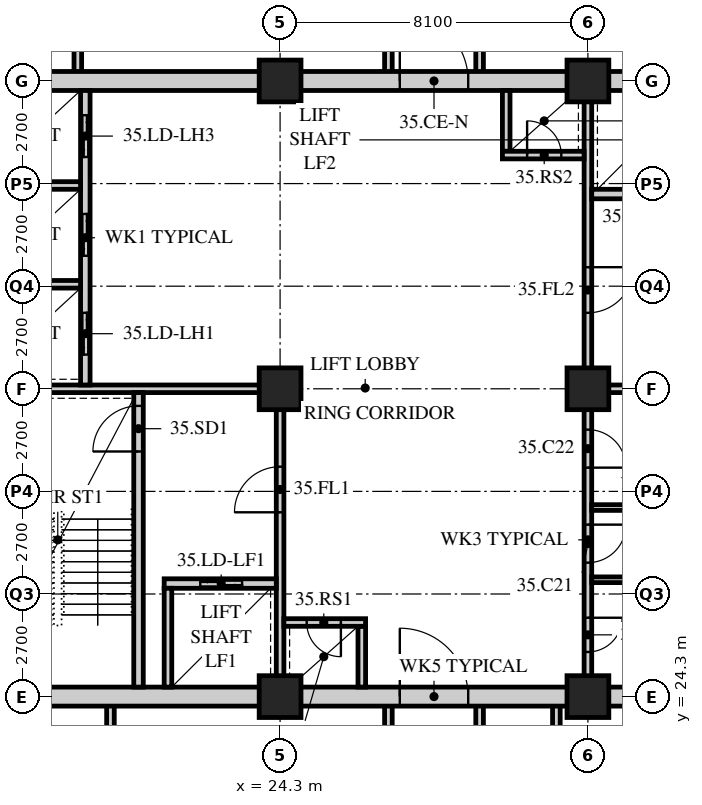
"""IFC4 building model, lengths in metres.
Left out: names, types, materials, properties, quantities, classifications, styles, units other than length and angle.
Written with IfcOpenShell. Run it as: python <this file> out.ifc"""

import sys

from ifc_helpers import new_model, si_unit, direction, frame, frame_2d, origin, origin_2d, place, context, subcontext, project, spatial, rectangle, hollow_rectangle, extrude, element, fill, save


model = new_model("IFC4")
c1 = context("Model", 3, precision=1e-05, world=origin(), true_north=direction((0.0, 1.0)))
c2 = subcontext(c1, "Body", "Model", "MODEL_VIEW")
j1 = project(units=[si_unit("LENGTHUNIT", "METRE"), si_unit("PLANEANGLEUNIT", "RADIAN")], contexts=[c1])
p1 = place(None, origin())
s1 = spatial("IfcSite", under=j1, at=p1, CompositionType="ELEMENT")
p2 = place(p1, origin())
s2 = spatial("IfcBuilding", under=s1, at=p2, CompositionType="ELEMENT")
p3 = place(p2, frame((0.0, 0.0, 137.4)))
s3 = spatial("IfcBuildingStorey", under=s2, at=p3, CompositionType="ELEMENT", Elevation=137.4)
for number, where, z_axis, x_axis in (
    (1, (24.3, 24.3, 0.0), (0.0, 0.0, 1.0), (1.0, 0.0, 0.0)),
    (2, (24.3, 32.4, 0.0), (0.0, 0.0, 1.0), (1.0, 0.0, 0.0)),
    (3, (24.3, 40.5, 0.0), (0.0, 0.0, 1.0), (1.0, 0.0, 0.0)),
    (4, (32.4, 24.3, 0.0), (0.0, 0.0, 1.0), (1.0, 0.0, 0.0)),
    (5, (32.4, 32.4, 0.0), (0.0, 0.0, 1.0), (1.0, 0.0, 0.0)),
    (6, (32.4, 40.5, 0.0), (0.0, 0.0, 1.0), (1.0, 0.0, 0.0)),
):
    element("IfcColumn", number, at=place(p3, frame(where, z_axis=z_axis, x_axis=x_axis)), inside=s3, PredefinedType="COLUMN", context=c2, shape_type="SweptSolid", body=[
        extrude(hollow_rectangle(XDim=1.1, YDim=1.1, WallThickness=0.1, at=origin_2d()), origin(), (0.0, 0.0, 1.0), 3.4),
    ])
for number, where, z_axis, x_axis in (
    (7, (19.836, 19.35, 0.0), (0.0, 0.0, 1.0), (0.0, 1.0, 0.0)),
    (8, (31.57, 19.35, 0.0), (0.0, 0.0, 1.0), (0.0, 1.0, 0.0)),
    (9, (27.15, 19.35, 0.0), (0.0, 0.0, 1.0), (0.0, 1.0, 0.0)),
    (10, (29.55, 19.35, 0.0), (0.0, 0.0, 1.0), (0.0, 1.0, 0.0)),
):
    element("IfcWall", number, at=place(p3, frame(where, z_axis=z_axis, x_axis=x_axis)), inside=s3, PredefinedType="SOLIDWALL", context=c2, shape_type="SweptSolid", body=[
        extrude(rectangle(XDim=4.95, YDim=0.2, at=frame_2d((2.475, 0.0))), origin(), (0.0, 0.0, 1.0), 3.19),
    ])
for number, where, z_axis, x_axis in (
    (11, (18.978, 44.1, 0.0), (0.0, 0.0, 1.0), (0.0, -1.0, 0.0)),
    (12, (27.15, 40.5, 0.0), (0.0, 0.0, 1.0), (0.0, 1.0, 0.0)),
    (13, (29.55, 40.5, 0.0), (0.0, 0.0, 1.0), (0.0, 1.0, 0.0)),
):
    element("IfcWall", number, at=place(p3, frame(where, z_axis=z_axis, x_axis=x_axis)), inside=s3, PredefinedType="SOLIDWALL", context=c2, shape_type="SweptSolid", body=[
        extrude(rectangle(XDim=3.6, YDim=0.2, at=frame_2d((1.8, 0.0))), origin(), (0.0, 0.0, 1.0), 3.19),
    ])
p4 = place(p3, frame((15.95, 24.3, 0.0), z_axis=(0.0, 0.0, 1.0), x_axis=(1.0, 0.0, 0.0)))
e14 = element("IfcWall", 14, at=p4, inside=s3, PredefinedType="SOLIDWALL", context=c2, shape_type="SweptSolid", body=[
    extrude(rectangle(XDim=24.8, YDim=0.5, at=frame_2d((12.4, 0.0))), origin(), (0.0, 0.0, 1.0), 2.54),
])
p5 = place(p4, frame((11.5, 0.0, 0.0)))
e15 = element("IfcOpeningElement", 15, at=p5, cuts=e14, PredefinedType="OPENING", context=c2, shape_type="SweptSolid", body=[
    extrude(rectangle(XDim=1.8, YDim=2.4, at=frame_2d((0.9, 1.2))), frame((0.0, 0.26, 0.0), z_axis=(0.0, -1.0, 0.0), x_axis=(1.0, 0.0, 0.0)), (0.0, 0.0, 1.0), 0.52),
])
p6 = place(p3, frame((15.95, 40.5, 0.0), z_axis=(0.0, 0.0, 1.0), x_axis=(1.0, 0.0, 0.0)))
e16 = element("IfcWall", 16, at=p6, inside=s3, PredefinedType="SOLIDWALL", context=c2, shape_type="SweptSolid", body=[
    extrude(rectangle(XDim=24.8, YDim=0.5, at=frame_2d((12.4, 0.0))), origin(), (0.0, 0.0, 1.0), 2.54),
])
p7 = place(p6, frame((11.5, 0.0, 0.0)))
e17 = element("IfcOpeningElement", 17, at=p7, cuts=e16, PredefinedType="OPENING", context=c2, shape_type="SweptSolid", body=[
    extrude(rectangle(XDim=1.8, YDim=2.4, at=frame_2d((0.9, 1.2))), frame((0.0, 0.26, 0.0), z_axis=(0.0, -1.0, 0.0), x_axis=(1.0, 0.0, 0.0)), (0.0, 0.0, 1.0), 0.52),
])
p8 = place(p3, frame((16.45, 32.4, 0.0), z_axis=(0.0, 0.0, 1.0), x_axis=(1.0, 0.0, 0.0)))
e18 = element("IfcWall", 18, at=p8, inside=s3, PredefinedType="SOLIDWALL", context=c2, shape_type="SweptSolid", body=[
    extrude(rectangle(XDim=7.95, YDim=0.2, at=frame_2d((3.975, 0.0))), origin(), (0.0, 0.0, 1.0), 2.578),
])
p9 = place(p3, frame((24.3, 24.55, 0.0), z_axis=(0.0, 0.0, 1.0), x_axis=(0.0, 1.0, 0.0)))
e19 = element("IfcWall", 19, at=p9, inside=s3, PredefinedType="SOLIDWALL", context=c2, shape_type="SweptSolid", body=[
    extrude(rectangle(XDim=7.75, YDim=0.2, at=frame_2d((3.875, 0.0))), origin(), (0.0, 0.0, 1.0), 2.578),
])
p10 = place(p9, frame((4.6, 0.0, 0.0)))
e20 = element("IfcOpeningElement", 20, at=p10, cuts=e19, PredefinedType="OPENING", context=c2, shape_type="SweptSolid", body=[
    extrude(rectangle(XDim=1.2, YDim=2.1, at=frame_2d((0.6, 1.05))), frame((0.0, 0.11, 0.0), z_axis=(0.0, -1.0, 0.0), x_axis=(1.0, 0.0, 0.0)), (0.0, 0.0, 1.0), 0.22),
])
p11 = place(p3, frame((20.575, 24.55, 0.0), z_axis=(0.0, 0.0, 1.0), x_axis=(0.0, 1.0, 0.0)))
e21 = element("IfcWall", 21, at=p11, inside=s3, PredefinedType="SOLIDWALL", context=c2, shape_type="SweptSolid", body=[
    extrude(rectangle(XDim=7.75, YDim=0.25, at=frame_2d((3.875, 0.0))), origin(), (0.0, 0.0, 1.0), 3.19),
])
p12 = place(p11, frame((6.2, 0.0, 0.0)))
e22 = element("IfcOpeningElement", 22, at=p12, cuts=e21, PredefinedType="OPENING", context=c2, shape_type="SweptSolid", body=[
    extrude(rectangle(XDim=1.2, YDim=2.1, at=frame_2d((0.6, 1.05))), frame((0.0, 0.135, 0.0), z_axis=(0.0, -1.0, 0.0), x_axis=(1.0, 0.0, 0.0)), (0.0, 0.0, 1.0), 0.27),
])
p13 = place(p3, frame((21.25, 27.275, 0.0), z_axis=(0.0, 0.0, 1.0), x_axis=(1.0, 0.0, 0.0)))
e23 = element("IfcWall", 23, at=p13, inside=s3, PredefinedType="SOLIDWALL", context=c2, shape_type="SweptSolid", body=[
    extrude(rectangle(XDim=2.95, YDim=0.25, at=frame_2d((1.475, 0.0))), origin(), (0.0, 0.0, 1.0), 3.19),
])
p14 = place(p13, frame((0.95, 0.0, 0.0)))
e24 = element("IfcOpeningElement", 24, at=p14, cuts=e23, PredefinedType="OPENING", context=c2, shape_type="SweptSolid", body=[
    extrude(rectangle(XDim=1.1, YDim=2.4, at=frame_2d((0.55, 1.2))), frame((0.0, 0.135, 0.0), z_axis=(0.0, -1.0, 0.0), x_axis=(1.0, 0.0, 0.0)), (0.0, 0.0, 1.0), 0.27),
])
p15 = place(p3, frame((21.35, 24.55, 0.0), z_axis=(0.0, 0.0, 1.0), x_axis=(0.0, 1.0, 0.0)))
e25 = element("IfcWall", 25, at=p15, inside=s3, PredefinedType="SOLIDWALL", context=c2, shape_type="SweptSolid", body=[
    extrude(rectangle(XDim=2.6, YDim=0.2, at=frame_2d((1.3, 0.0))), origin(), (0.0, 0.0, 1.0), 3.19),
])
p16 = place(p3, frame((19.175, 32.5, 0.0), z_axis=(0.0, 0.0, 1.0), x_axis=(0.0, 1.0, 0.0)))
e26 = element("IfcWall", 26, at=p16, inside=s3, PredefinedType="SOLIDWALL", context=c2, shape_type="SweptSolid", body=[
    extrude(rectangle(XDim=7.75, YDim=0.25, at=frame_2d((3.875, 0.0))), origin(), (0.0, 0.0, 1.0), 3.19),
])
p17 = place(p16, frame((0.8, 0.0, 0.0)))
e27 = element("IfcOpeningElement", 27, at=p17, cuts=e26, PredefinedType="OPENING", context=c2, shape_type="SweptSolid", body=[
    extrude(rectangle(XDim=1.1, YDim=2.4, at=frame_2d((0.55, 1.2))), frame((0.0, 0.135, 0.0), z_axis=(0.0, -1.0, 0.0), x_axis=(1.0, 0.0, 0.0)), (0.0, 0.0, 1.0), 0.27),
])
p18 = place(p16, frame((3.4, 0.0, 0.0)))
e28 = element("IfcOpeningElement", 28, at=p18, cuts=e26, PredefinedType="OPENING", context=c2, shape_type="SweptSolid", body=[
    extrude(rectangle(XDim=1.1, YDim=2.4, at=frame_2d((0.55, 1.2))), frame((0.0, 0.135, 0.0), z_axis=(0.0, -1.0, 0.0), x_axis=(1.0, 0.0, 0.0)), (0.0, 0.0, 1.0), 0.27),
])
p19 = place(p16, frame((6.0, 0.0, 0.0)))
e29 = element("IfcOpeningElement", 29, at=p19, cuts=e26, PredefinedType="OPENING", context=c2, shape_type="SweptSolid", body=[
    extrude(rectangle(XDim=1.1, YDim=2.4, at=frame_2d((0.55, 1.2))), frame((0.0, 0.135, 0.0), z_axis=(0.0, -1.0, 0.0), x_axis=(1.0, 0.0, 0.0)), (0.0, 0.0, 1.0), 0.27),
])
for number, where, z_axis, x_axis in (
    (30, (16.45, 35.15, 0.0), (0.0, 0.0, 1.0), (1.0, 0.0, 0.0)),
    (31, (16.45, 37.75, 0.0), (0.0, 0.0, 1.0), (1.0, 0.0, 0.0)),
):
    element("IfcWall", number, at=place(p3, frame(where, z_axis=z_axis, x_axis=x_axis)), inside=s3, PredefinedType="SOLIDWALL", context=c2, shape_type="SweptSolid", body=[
        extrude(rectangle(XDim=2.6, YDim=0.2, at=frame_2d((1.3, 0.0))), origin(), (0.0, 0.0, 1.0), 3.19),
    ])
p20 = place(p3, frame((26.45, 24.55, 0.0), z_axis=(0.0, 0.0, 1.0), x_axis=(0.0, 1.0, 0.0)))
e32 = element("IfcWall", 32, at=p20, inside=s3, PredefinedType="SOLIDWALL", context=c2, shape_type="SweptSolid", body=[
    extrude(rectangle(XDim=1.6, YDim=0.2, at=frame_2d((0.8, 0.0))), origin(), (0.0, 0.0, 1.0), 3.19),
])
p21 = place(p3, frame((24.4, 26.25, 0.0), z_axis=(0.0, 0.0, 1.0), x_axis=(1.0, 0.0, 0.0)))
e33 = element("IfcWall", 33, at=p21, inside=s3, PredefinedType="SOLIDWALL", context=c2, shape_type="SweptSolid", body=[
    extrude(rectangle(XDim=2.15, YDim=0.2, at=frame_2d((1.075, 0.0))), origin(), (0.0, 0.0, 1.0), 3.19),
])
p22 = place(p21, frame((0.6, 0.0, 0.0)))
e34 = element("IfcOpeningElement", 34, at=p22, cuts=e33, PredefinedType="OPENING", context=c2, shape_type="SweptSolid", body=[
    extrude(rectangle(XDim=0.9, YDim=2.1, at=frame_2d((0.45, 1.05))), frame((0.0, 0.11, 0.0), z_axis=(0.0, -1.0, 0.0), x_axis=(1.0, 0.0, 0.0)), (0.0, 0.0, 1.0), 0.22),
])
p23 = place(p3, frame((32.3, 32.4, 0.0), z_axis=(0.0, 0.0, 1.0), x_axis=(1.0, 0.0, 0.0)))
e35 = element("IfcWall", 35, at=p23, inside=s3, PredefinedType="SOLIDWALL", context=c2, shape_type="SweptSolid", body=[
    extrude(rectangle(XDim=7.95, YDim=0.2, at=frame_2d((3.975, 0.0))), origin(), (0.0, 0.0, 1.0), 2.578),
])
p24 = place(p3, frame((32.4, 32.5, 0.0), z_axis=(0.0, 0.0, 1.0), x_axis=(0.0, 1.0, 0.0)))
e36 = element("IfcWall", 36, at=p24, inside=s3, PredefinedType="SOLIDWALL", context=c2, shape_type="SweptSolid", body=[
    extrude(rectangle(XDim=7.75, YDim=0.2, at=frame_2d((3.875, 0.0))), origin(), (0.0, 0.0, 1.0), 2.578),
])
p25 = place(p24, frame((1.9, 0.0, 0.0)))
e37 = element("IfcOpeningElement", 37, at=p25, cuts=e36, PredefinedType="OPENING", context=c2, shape_type="SweptSolid", body=[
    extrude(rectangle(XDim=1.2, YDim=2.1, at=frame_2d((0.6, 1.05))), frame((0.0, 0.11, 0.0), z_axis=(0.0, -1.0, 0.0), x_axis=(1.0, 0.0, 0.0)), (0.0, 0.0, 1.0), 0.22),
])
p26 = place(p3, frame((32.5, 37.525, 0.0), z_axis=(0.0, 0.0, 1.0), x_axis=(1.0, 0.0, 0.0)))
e38 = element("IfcWall", 38, at=p26, inside=s3, PredefinedType="SOLIDWALL", context=c2, shape_type="SweptSolid", body=[
    extrude(rectangle(XDim=2.95, YDim=0.25, at=frame_2d((1.475, 0.0))), origin(), (0.0, 0.0, 1.0), 3.19),
])
p27 = place(p26, frame((0.9, 0.0, 0.0)))
e39 = element("IfcOpeningElement", 39, at=p27, cuts=e38, PredefinedType="OPENING", context=c2, shape_type="SweptSolid", body=[
    extrude(rectangle(XDim=1.1, YDim=2.4, at=frame_2d((0.55, 1.2))), frame((0.0, 0.135, 0.0), z_axis=(0.0, -1.0, 0.0), x_axis=(1.0, 0.0, 0.0)), (0.0, 0.0, 1.0), 0.27),
])
p28 = place(p3, frame((30.25, 38.65, 0.0), z_axis=(0.0, 0.0, 1.0), x_axis=(0.0, 1.0, 0.0)))
e40 = element("IfcWall", 40, at=p28, inside=s3, PredefinedType="SOLIDWALL", context=c2, shape_type="SweptSolid", body=[
    extrude(rectangle(XDim=1.6, YDim=0.2, at=frame_2d((0.8, 0.0))), origin(), (0.0, 0.0, 1.0), 3.19),
])
p29 = place(p3, frame((30.15, 38.55, 0.0), z_axis=(0.0, 0.0, 1.0), x_axis=(1.0, 0.0, 0.0)))
e41 = element("IfcWall", 41, at=p29, inside=s3, PredefinedType="SOLIDWALL", context=c2, shape_type="SweptSolid", body=[
    extrude(rectangle(XDim=2.15, YDim=0.2, at=frame_2d((1.075, 0.0))), origin(), (0.0, 0.0, 1.0), 3.19),
])
p30 = place(p29, frame((0.65, 0.0, 0.0)))
e42 = element("IfcOpeningElement", 42, at=p30, cuts=e41, PredefinedType="OPENING", context=c2, shape_type="SweptSolid", body=[
    extrude(rectangle(XDim=0.9, YDim=2.1, at=frame_2d((0.45, 1.05))), frame((0.0, 0.11, 0.0), z_axis=(0.0, -1.0, 0.0), x_axis=(1.0, 0.0, 0.0)), (0.0, 0.0, 1.0), 0.22),
])
p31 = place(p3, frame((32.4, 24.55, 0.0), z_axis=(0.0, 0.0, 1.0), x_axis=(0.0, 1.0, 0.0)))
e43 = element("IfcWall", 43, at=p31, inside=s3, PredefinedType="PARTITIONING", context=c2, shape_type="SweptSolid", body=[
    extrude(rectangle(XDim=7.75, YDim=0.2, at=frame_2d((3.875, 0.0))), origin(), (0.0, 0.0, 1.0), 2.578),
])
p32 = place(p31, frame((0.925, 0.0, 0.0)))
e44 = element("IfcOpeningElement", 44, at=p32, cuts=e43, PredefinedType="OPENING", context=c2, shape_type="SweptSolid", body=[
    extrude(rectangle(XDim=0.9, YDim=2.1, at=frame_2d((0.45, 1.05))), frame((0.0, 0.11, 0.0), z_axis=(0.0, -1.0, 0.0), x_axis=(1.0, 0.0, 0.0)), (0.0, 0.0, 1.0), 0.22),
])
p33 = place(p31, frame((3.275, 0.0, 0.0)))
e45 = element("IfcOpeningElement", 45, at=p33, cuts=e43, PredefinedType="OPENING", context=c2, shape_type="SweptSolid", body=[
    extrude(rectangle(XDim=1.0, YDim=2.1, at=frame_2d((0.5, 1.05))), frame((0.0, 0.11, 0.0), z_axis=(0.0, -1.0, 0.0), x_axis=(1.0, 0.0, 0.0)), (0.0, 0.0, 1.0), 0.22),
])
p34 = place(p31, frame((5.775, 0.0, 0.0)))
e46 = element("IfcOpeningElement", 46, at=p34, cuts=e43, PredefinedType="OPENING", context=c2, shape_type="SweptSolid", body=[
    extrude(rectangle(XDim=1.0, YDim=2.1, at=frame_2d((0.5, 1.05))), frame((0.0, 0.11, 0.0), z_axis=(0.0, -1.0, 0.0), x_axis=(1.0, 0.0, 0.0)), (0.0, 0.0, 1.0), 0.22),
])
p35 = place(p3, frame((32.5, 27.375, 0.0), z_axis=(0.0, 0.0, 1.0), x_axis=(1.0, 0.0, 0.0)))
e47 = element("IfcWall", 47, at=p35, inside=s3, PredefinedType="PARTITIONING", context=c2, shape_type="SweptSolid", body=[
    extrude(rectangle(XDim=2.15, YDim=0.15, at=frame_2d((1.075, 0.0))), origin(), (0.0, 0.0, 1.0), 3.19),
])
p36 = place(p3, frame((32.5, 29.275, 0.0), z_axis=(0.0, 0.0, 1.0), x_axis=(1.0, 0.0, 0.0)))
e48 = element("IfcWall", 48, at=p36, inside=s3, PredefinedType="PARTITIONING", context=c2, shape_type="SweptSolid", body=[
    extrude(rectangle(XDim=4.9, YDim=0.15, at=frame_2d((2.45, 0.0))), origin(), (0.0, 0.0, 1.0), 3.19),
])
p37 = place(p32, origin())
e49 = element("IfcDoor", 49, at=p37, inside=s3, OperationType="SINGLE_SWING_LEFT", PredefinedType="DOOR", context=c2, shape_type="SweptSolid", body=[
    extrude(rectangle(XDim=0.9, YDim=2.1, at=frame_2d((0.45, 1.05))), frame((0.0, 0.025, 0.0), z_axis=(0.0, -1.0, 0.0), x_axis=(1.0, 0.0, 0.0)), (0.0, 0.0, 1.0), 0.05),
])
fill(e44, e49)
p38 = place(p33, origin())
e50 = element("IfcDoor", 50, at=p38, inside=s3, OperationType="SINGLE_SWING_LEFT", PredefinedType="DOOR", context=c2, shape_type="SweptSolid", body=[
    extrude(rectangle(XDim=1.0, YDim=2.1, at=frame_2d((0.5, 1.05))), frame((0.0, 0.025, 0.0), z_axis=(0.0, -1.0, 0.0), x_axis=(1.0, 0.0, 0.0)), (0.0, 0.0, 1.0), 0.05),
])
fill(e45, e50)
p39 = place(p34, origin())
e51 = element("IfcDoor", 51, at=p39, inside=s3, OperationType="SINGLE_SWING_RIGHT", PredefinedType="DOOR", context=c2, shape_type="SweptSolid", body=[
    extrude(rectangle(XDim=1.0, YDim=2.1, at=frame_2d((0.5, 1.05))), frame((0.0, 0.025, 0.0), z_axis=(0.0, -1.0, 0.0), x_axis=(1.0, 0.0, 0.0)), (0.0, 0.0, 1.0), 0.05),
])
fill(e46, e51)
p40 = place(p12, origin())
e52 = element("IfcDoor", 52, at=p40, inside=s3, OperationType="SINGLE_SWING_LEFT", PredefinedType="DOOR", context=c2, shape_type="SweptSolid", body=[
    extrude(rectangle(XDim=1.2, YDim=2.1, at=frame_2d((0.6, 1.05))), frame((0.0, 0.025, 0.0), z_axis=(0.0, -1.0, 0.0), x_axis=(1.0, 0.0, 0.0)), (0.0, 0.0, 1.0), 0.05),
])
fill(e22, e52)
p41 = place(p10, origin())
e53 = element("IfcDoor", 53, at=p41, inside=s3, OperationType="SINGLE_SWING_LEFT", PredefinedType="DOOR", context=c2, shape_type="SweptSolid", body=[
    extrude(rectangle(XDim=1.2, YDim=2.1, at=frame_2d((0.6, 1.05))), frame((0.0, 0.025, 0.0), z_axis=(0.0, -1.0, 0.0), x_axis=(1.0, 0.0, 0.0)), (0.0, 0.0, 1.0), 0.05),
])
fill(e20, e53)
p42 = place(p22, origin())
e54 = element("IfcDoor", 54, at=p42, inside=s3, OperationType="SINGLE_SWING_LEFT", PredefinedType="DOOR", context=c2, shape_type="SweptSolid", body=[
    extrude(rectangle(XDim=0.9, YDim=2.1, at=frame_2d((0.45, 1.05))), frame((0.0, 0.025, 0.0), z_axis=(0.0, -1.0, 0.0), x_axis=(1.0, 0.0, 0.0)), (0.0, 0.0, 1.0), 0.05),
])
fill(e34, e54)
p43 = place(p25, origin())
e55 = element("IfcDoor", 55, at=p43, inside=s3, OperationType="SINGLE_SWING_LEFT", PredefinedType="DOOR", context=c2, shape_type="SweptSolid", body=[
    extrude(rectangle(XDim=1.2, YDim=2.1, at=frame_2d((0.6, 1.05))), frame((0.0, 0.025, 0.0), z_axis=(0.0, -1.0, 0.0), x_axis=(1.0, 0.0, 0.0)), (0.0, 0.0, 1.0), 0.05),
])
fill(e37, e55)
p44 = place(p30, origin())
e56 = element("IfcDoor", 56, at=p44, inside=s3, OperationType="SINGLE_SWING_LEFT", PredefinedType="DOOR", context=c2, shape_type="SweptSolid", body=[
    extrude(rectangle(XDim=0.9, YDim=2.1, at=frame_2d((0.45, 1.05))), frame((0.0, 0.025, 0.0), z_axis=(0.0, -1.0, 0.0), x_axis=(1.0, 0.0, 0.0)), (0.0, 0.0, 1.0), 0.05),
])
fill(e42, e56)
p45 = place(p17, origin())
e57 = element("IfcDoor", 57, at=p45, inside=s3, OperationType="DOUBLE_DOOR_SLIDING", PredefinedType="DOOR", context=c2, shape_type="SweptSolid", body=[
    extrude(rectangle(XDim=1.1, YDim=2.4, at=frame_2d((0.55, 1.2))), frame((0.0, 0.025, 0.0), z_axis=(0.0, -1.0, 0.0), x_axis=(1.0, 0.0, 0.0)), (0.0, 0.0, 1.0), 0.05),
])
fill(e27, e57)
p46 = place(p18, origin())
e58 = element("IfcDoor", 58, at=p46, inside=s3, OperationType="DOUBLE_DOOR_SLIDING", PredefinedType="DOOR", context=c2, shape_type="SweptSolid", body=[
    extrude(rectangle(XDim=1.1, YDim=2.4, at=frame_2d((0.55, 1.2))), frame((0.0, 0.025, 0.0), z_axis=(0.0, -1.0, 0.0), x_axis=(1.0, 0.0, 0.0)), (0.0, 0.0, 1.0), 0.05),
])
fill(e28, e58)
p47 = place(p19, origin())
e59 = element("IfcDoor", 59, at=p47, inside=s3, OperationType="DOUBLE_DOOR_SLIDING", PredefinedType="DOOR", context=c2, shape_type="SweptSolid", body=[
    extrude(rectangle(XDim=1.1, YDim=2.4, at=frame_2d((0.55, 1.2))), frame((0.0, 0.025, 0.0), z_axis=(0.0, -1.0, 0.0), x_axis=(1.0, 0.0, 0.0)), (0.0, 0.0, 1.0), 0.05),
])
fill(e29, e59)
p48 = place(p14, origin())
e60 = element("IfcDoor", 60, at=p48, inside=s3, OperationType="DOUBLE_DOOR_SLIDING", PredefinedType="DOOR", context=c2, shape_type="SweptSolid", body=[
    extrude(rectangle(XDim=1.1, YDim=2.4, at=frame_2d((0.55, 1.2))), frame((0.0, 0.025, 0.0), z_axis=(0.0, -1.0, 0.0), x_axis=(1.0, 0.0, 0.0)), (0.0, 0.0, 1.0), 0.05),
])
fill(e24, e60)
p49 = place(p5, origin())
e61 = element("IfcDoor", 61, at=p49, inside=s3, OperationType="DOUBLE_DOOR_SINGLE_SWING", PredefinedType="DOOR", context=c2, shape_type="SweptSolid", body=[
    extrude(rectangle(XDim=1.8, YDim=2.4, at=frame_2d((0.9, 1.2))), frame((0.0, 0.025, 0.0), z_axis=(0.0, -1.0, 0.0), x_axis=(1.0, 0.0, 0.0)), (0.0, 0.0, 1.0), 0.05),
])
fill(e15, e61)
p50 = place(p7, origin())
e62 = element("IfcDoor", 62, at=p50, inside=s3, OperationType="DOUBLE_DOOR_SINGLE_SWING", PredefinedType="DOOR", context=c2, shape_type="SweptSolid", body=[
    extrude(rectangle(XDim=1.8, YDim=2.4, at=frame_2d((0.9, 1.2))), frame((0.0, 0.025, 0.0), z_axis=(0.0, -1.0, 0.0), x_axis=(1.0, 0.0, 0.0)), (0.0, 0.0, 1.0), 0.05),
])
fill(e17, e62)
save(model, sys.argv[1])
